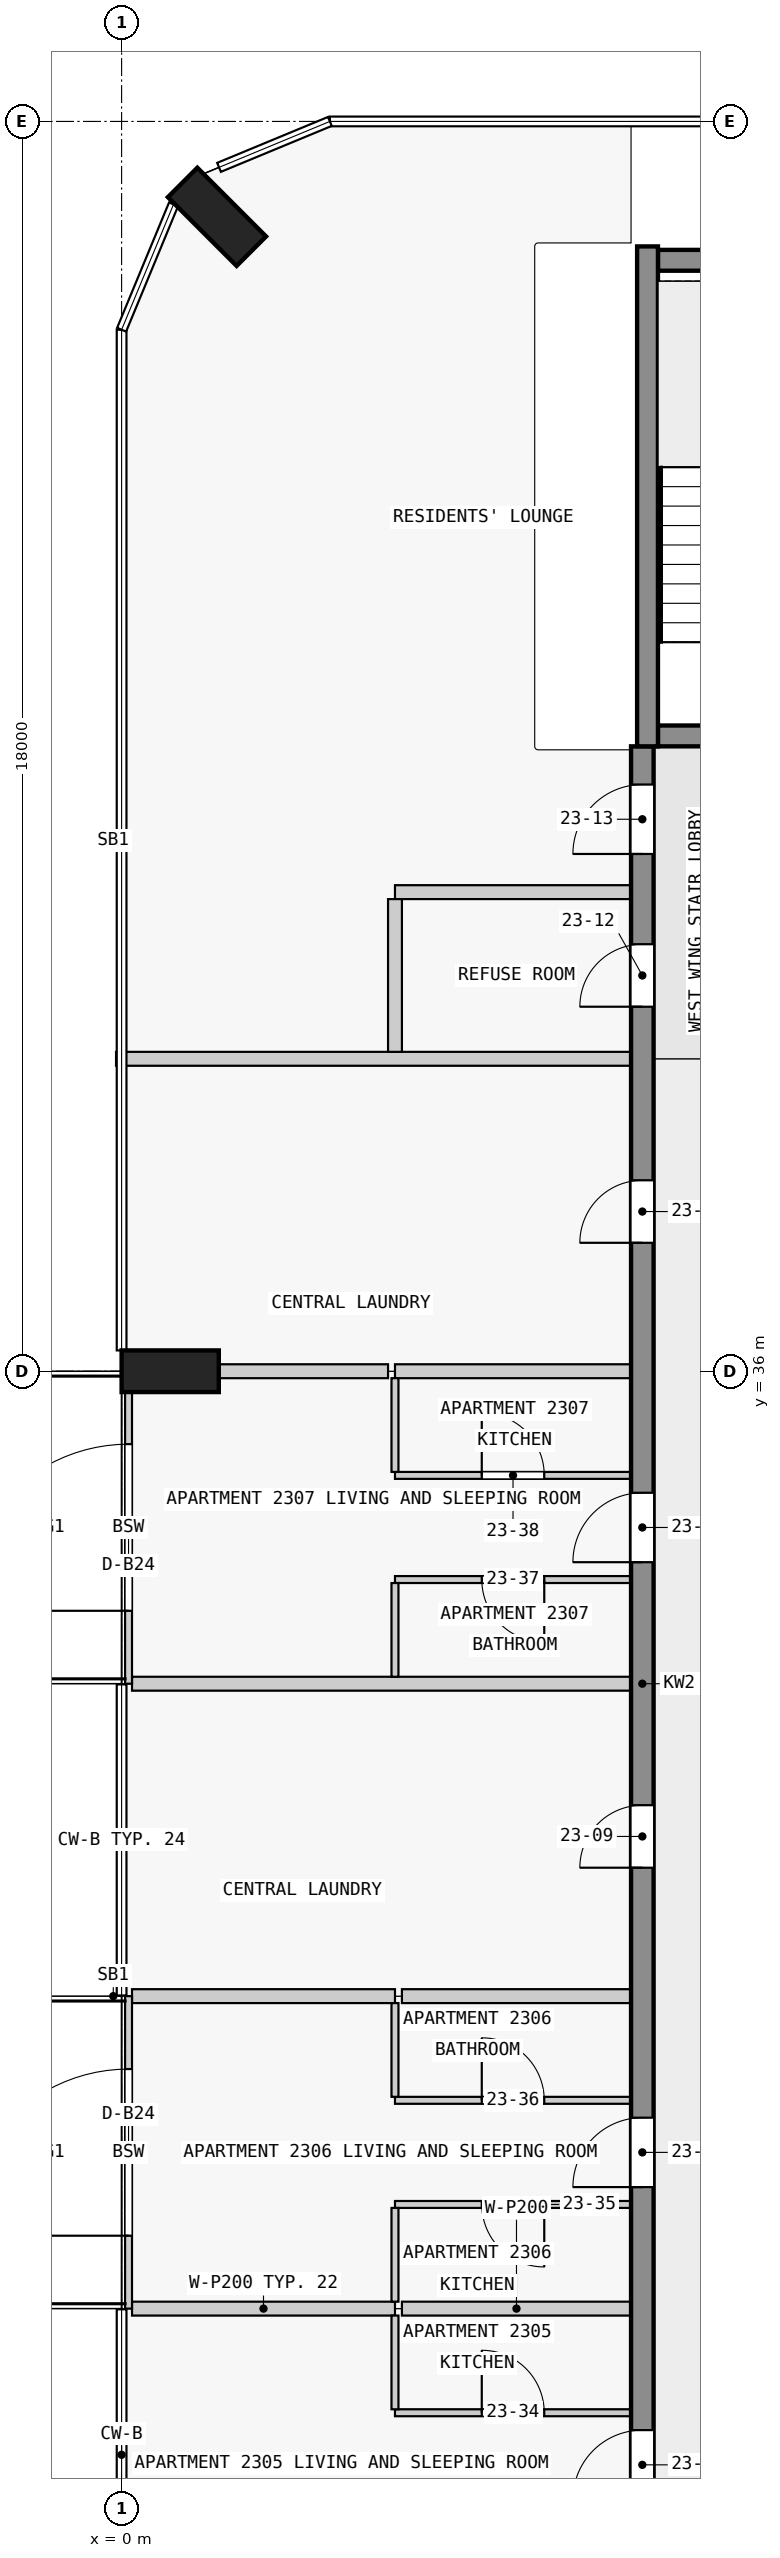
"""IFC4 building model, lengths in metres.
Left out: names, types, materials, properties, quantities, classifications, styles, units other than length and angle.
Written with IfcOpenShell. Run it as: python <this file> out.ifc"""

import sys

from ifc_helpers import new_model, si_unit, direction, frame, frame_2d, origin, origin_2d, place, context, subcontext, project, spatial, rectangle, extrude, element, fill, save


model = new_model("IFC4")
c1 = context("Model", 3, precision=1e-05, world=origin(), true_north=direction((0.0, 1.0)))
c2 = subcontext(c1, "Body", "Model", "MODEL_VIEW")
j1 = project(units=[si_unit("LENGTHUNIT", "METRE"), si_unit("PLANEANGLEUNIT", "RADIAN")], contexts=[c1])
p1 = place(None, origin())
s1 = spatial("IfcSite", under=j1, at=p1, CompositionType="ELEMENT")
p2 = place(p1, origin())
s2 = spatial("IfcBuilding", under=s1, at=p2, CompositionType="ELEMENT")
p3 = place(p2, frame((0.0, 0.0, 92.3)))
s3 = spatial("IfcBuildingStorey", under=s2, at=p3, CompositionType="ELEMENT", Elevation=92.3)
for number, where, z_axis, x_axis in (
    (1, (1.374, 52.626, 0.0), (0.0, 0.0, 1.0), (0.707, 0.707, 0.0)),
    (2, (0.7, 36.0, 0.0), (0.0, 0.0, 1.0), (0.0, 1.0, 0.0)),
):
    element("IfcColumn", number, at=place(p3, frame(where, z_axis=z_axis, x_axis=x_axis)), inside=s3, PredefinedType="COLUMN", context=c2, shape_type="SweptSolid", body=[
        extrude(rectangle(XDim=0.6, YDim=1.4, at=origin_2d()), origin(), (0.0, 0.0, 1.0), 3.5),
    ])
p4 = place(p3, frame((7.725, 45.15, 0.0), z_axis=(0.0, 0.0, 1.0), x_axis=(1.0, 0.0, 0.0)))
e3 = element("IfcWall", 3, at=p4, inside=s3, PredefinedType="SHEAR", context=c2, shape_type="SweptSolid", body=[
    extrude(rectangle(XDim=2.55, YDim=0.3, at=frame_2d((1.275, 0.0))), origin(), (0.0, 0.0, 1.0), 3.5),
])
p5 = place(p4, frame((0.725, 0.0, 0.0)))
e4 = element("IfcOpeningElement", 4, at=p5, cuts=e3, PredefinedType="OPENING", context=c2, shape_type="SweptSolid", body=[
    extrude(rectangle(XDim=1.1, YDim=2.1, at=frame_2d((0.55, 1.05))), frame((0.0, 0.16, 0.0), z_axis=(0.0, -1.0, 0.0), x_axis=(1.0, 0.0, 0.0)), (0.0, 0.0, 1.0), 0.32),
])
p6 = place(p3, frame((7.725, 52.0, 0.0), z_axis=(0.0, 0.0, 1.0), x_axis=(1.0, 0.0, 0.0)))
e5 = element("IfcWall", 5, at=p6, inside=s3, PredefinedType="SHEAR", context=c2, shape_type="SweptSolid", body=[
    extrude(rectangle(XDim=2.55, YDim=0.3, at=frame_2d((1.275, 0.0))), origin(), (0.0, 0.0, 1.0), 3.5),
])
p7 = place(p3, frame((7.575, 45.0, 0.0), z_axis=(0.0, 0.0, 1.0), x_axis=(0.0, 1.0, 0.0)))
e6 = element("IfcWall", 6, at=p7, inside=s3, PredefinedType="SHEAR", context=c2, shape_type="SweptSolid", body=[
    extrude(rectangle(XDim=7.2, YDim=0.3, at=frame_2d((3.6, 0.0))), origin(), (0.0, 0.0, 1.0), 3.5),
])
p8 = place(p3, frame((7.5, 18.0, 0.0), z_axis=(0.0, 0.0, 1.0), x_axis=(0.0, 1.0, 0.0)))
e7 = element("IfcWall", 7, at=p8, inside=s3, PredefinedType="SHEAR", context=c2, shape_type="SweptSolid", body=[
    extrude(rectangle(XDim=27.0, YDim=0.325, at=frame_2d((13.5, 0.0))), origin(), (0.0, 0.0, 1.0), 3.25),
])
p9 = place(p8, frame((1.75, 0.0, 0.0)))
e8 = element("IfcOpeningElement", 8, at=p9, cuts=e7, PredefinedType="OPENING", context=c2, shape_type="SweptSolid", body=[
    extrude(rectangle(XDim=1.0, YDim=2.1, at=frame_2d((0.5, 1.05))), frame((0.0, 0.172, 0.0), z_axis=(0.0, -1.0, 0.0), x_axis=(1.0, 0.0, 0.0)), (0.0, 0.0, 1.0), 0.345),
])
p10 = place(p8, frame((6.25, 0.0, 0.0)))
e9 = element("IfcOpeningElement", 9, at=p10, cuts=e7, PredefinedType="OPENING", context=c2, shape_type="SweptSolid", body=[
    extrude(rectangle(XDim=1.0, YDim=2.1, at=frame_2d((0.5, 1.05))), frame((0.0, 0.172, 0.0), z_axis=(0.0, -1.0, 0.0), x_axis=(1.0, 0.0, 0.0)), (0.0, 0.0, 1.0), 0.345),
])
p11 = place(p8, frame((10.85, 0.0, 0.0)))
e10 = element("IfcOpeningElement", 10, at=p11, cuts=e7, PredefinedType="OPENING", context=c2, shape_type="SweptSolid", body=[
    extrude(rectangle(XDim=0.9, YDim=2.1, at=frame_2d((0.45, 1.05))), frame((0.0, 0.172, 0.0), z_axis=(0.0, -1.0, 0.0), x_axis=(1.0, 0.0, 0.0)), (0.0, 0.0, 1.0), 0.345),
])
p12 = place(p8, frame((15.25, 0.0, 0.0)))
e11 = element("IfcOpeningElement", 11, at=p12, cuts=e7, PredefinedType="OPENING", context=c2, shape_type="SweptSolid", body=[
    extrude(rectangle(XDim=1.0, YDim=2.1, at=frame_2d((0.5, 1.05))), frame((0.0, 0.172, 0.0), z_axis=(0.0, -1.0, 0.0), x_axis=(1.0, 0.0, 0.0)), (0.0, 0.0, 1.0), 0.345),
])
p13 = place(p8, frame((19.85, 0.0, 0.0)))
e12 = element("IfcOpeningElement", 12, at=p13, cuts=e7, PredefinedType="OPENING", context=c2, shape_type="SweptSolid", body=[
    extrude(rectangle(XDim=0.9, YDim=2.1, at=frame_2d((0.45, 1.05))), frame((0.0, 0.172, 0.0), z_axis=(0.0, -1.0, 0.0), x_axis=(1.0, 0.0, 0.0)), (0.0, 0.0, 1.0), 0.345),
])
p14 = place(p8, frame((23.25, 0.0, 0.0)))
e13 = element("IfcOpeningElement", 13, at=p14, cuts=e7, PredefinedType="OPENING", context=c2, shape_type="SweptSolid", body=[
    extrude(rectangle(XDim=0.9, YDim=2.1, at=frame_2d((0.45, 1.05))), frame((0.0, 0.172, 0.0), z_axis=(0.0, -1.0, 0.0), x_axis=(1.0, 0.0, 0.0)), (0.0, 0.0, 1.0), 0.345),
])
p15 = place(p8, frame((25.45, 0.0, 0.0)))
e14 = element("IfcOpeningElement", 14, at=p15, cuts=e7, PredefinedType="OPENING", context=c2, shape_type="SweptSolid", body=[
    extrude(rectangle(XDim=1.0, YDim=2.1, at=frame_2d((0.5, 1.05))), frame((0.0, 0.172, 0.0), z_axis=(0.0, -1.0, 0.0), x_axis=(1.0, 0.0, 0.0)), (0.0, 0.0, 1.0), 0.345),
])
p16 = place(p3, frame((0.1, 22.5, 0.0), z_axis=(0.0, 0.0, 1.0), x_axis=(0.0, 1.0, 0.0)))
e15 = element("IfcWall", 15, at=p16, inside=s3, PredefinedType="STANDARD", context=c2, shape_type="SweptSolid", body=[
    extrude(rectangle(XDim=4.5, YDim=0.1, at=frame_2d((2.25, 0.0))), origin(), (0.0, 0.0, 1.0), 3.25),
])
p17 = place(p16, frame((1.05, 0.0, 0.0)))
e16 = element("IfcOpeningElement", 16, at=p17, cuts=e15, PredefinedType="OPENING", context=c2, shape_type="SweptSolid", body=[
    extrude(rectangle(XDim=2.4, YDim=2.4, at=frame_2d((1.2, 1.2))), frame((0.0, 0.06, 0.0), z_axis=(0.0, -1.0, 0.0), x_axis=(1.0, 0.0, 0.0)), (0.0, 0.0, 1.0), 0.12),
])
p18 = place(p3, frame((0.1, 31.5, 0.0), z_axis=(0.0, 0.0, 1.0), x_axis=(0.0, 1.0, 0.0)))
e17 = element("IfcWall", 17, at=p18, inside=s3, PredefinedType="STANDARD", context=c2, shape_type="SweptSolid", body=[
    extrude(rectangle(XDim=4.5, YDim=0.1, at=frame_2d((2.25, 0.0))), origin(), (0.0, 0.0, 1.0), 3.25),
])
p19 = place(p18, frame((1.05, 0.0, 0.0)))
e18 = element("IfcOpeningElement", 18, at=p19, cuts=e17, PredefinedType="OPENING", context=c2, shape_type="SweptSolid", body=[
    extrude(rectangle(XDim=2.4, YDim=2.4, at=frame_2d((1.2, 1.2))), frame((0.0, 0.06, 0.0), z_axis=(0.0, -1.0, 0.0), x_axis=(1.0, 0.0, 0.0)), (0.0, 0.0, 1.0), 0.12),
])
p20 = place(p3, frame((3.938, 21.0, 0.0), z_axis=(0.0, 0.0, 1.0), x_axis=(1.0, 0.0, 0.0)))
e19 = element("IfcWall", 19, at=p20, inside=s3, PredefinedType="PARTITIONING", context=c2, shape_type="SweptSolid", body=[
    extrude(rectangle(XDim=3.4, YDim=0.1, at=frame_2d((1.7, 0.0))), origin(), (0.0, 0.0, 1.0), 3.25),
])
p21 = place(p20, frame((1.25, 0.0, 0.0)))
e20 = element("IfcOpeningElement", 20, at=p21, cuts=e19, PredefinedType="OPENING", context=c2, shape_type="SweptSolid", body=[
    extrude(rectangle(XDim=0.9, YDim=2.1, at=frame_2d((0.45, 1.05))), frame((0.0, 0.06, 0.0), z_axis=(0.0, -1.0, 0.0), x_axis=(1.0, 0.0, 0.0)), (0.0, 0.0, 1.0), 0.12),
])
p22 = place(p3, frame((7.337, 22.5, 0.0), z_axis=(0.0, 0.0, 1.0), x_axis=(-1.0, 0.0, 0.0)))
e21 = element("IfcWall", 21, at=p22, inside=s3, PredefinedType="PARTITIONING", context=c2, shape_type="SweptSolid", body=[
    extrude(rectangle(XDim=3.3, YDim=0.2, at=frame_2d((1.65, 0.0))), origin(), (0.0, 0.0, 1.0), 3.25),
])
p23 = place(p3, frame((0.15, 22.5, 0.0), z_axis=(0.0, 0.0, 1.0), x_axis=(1.0, 0.0, 0.0)))
e22 = element("IfcWall", 22, at=p23, inside=s3, PredefinedType="PARTITIONING", context=c2, shape_type="SweptSolid", body=[
    extrude(rectangle(XDim=3.788, YDim=0.2, at=frame_2d((1.894, 0.0))), origin(), (0.0, 0.0, 1.0), 3.25),
])
p24 = place(p3, frame((7.337, 24.0, 0.0), z_axis=(0.0, 0.0, 1.0), x_axis=(-1.0, 0.0, 0.0)))
e23 = element("IfcWall", 23, at=p24, inside=s3, PredefinedType="PARTITIONING", context=c2, shape_type="SweptSolid", body=[
    extrude(rectangle(XDim=3.4, YDim=0.1, at=frame_2d((1.7, 0.0))), origin(), (0.0, 0.0, 1.0), 3.25),
])
p25 = place(p24, frame((1.25, 0.0, 0.0)))
e24 = element("IfcOpeningElement", 24, at=p25, cuts=e23, PredefinedType="OPENING", context=c2, shape_type="SweptSolid", body=[
    extrude(rectangle(XDim=0.9, YDim=2.1, at=frame_2d((0.45, 1.05))), frame((0.0, 0.06, 0.0), z_axis=(0.0, -1.0, 0.0), x_axis=(1.0, 0.0, 0.0)), (0.0, 0.0, 1.0), 0.12),
])
p26 = place(p3, frame((3.938, 25.5, 0.0), z_axis=(0.0, 0.0, 1.0), x_axis=(1.0, 0.0, 0.0)))
e25 = element("IfcWall", 25, at=p26, inside=s3, PredefinedType="PARTITIONING", context=c2, shape_type="SweptSolid", body=[
    extrude(rectangle(XDim=3.4, YDim=0.1, at=frame_2d((1.7, 0.0))), origin(), (0.0, 0.0, 1.0), 3.25),
])
p27 = place(p26, frame((1.25, 0.0, 0.0)))
e26 = element("IfcOpeningElement", 26, at=p27, cuts=e25, PredefinedType="OPENING", context=c2, shape_type="SweptSolid", body=[
    extrude(rectangle(XDim=0.9, YDim=2.1, at=frame_2d((0.45, 1.05))), frame((0.0, 0.06, 0.0), z_axis=(0.0, -1.0, 0.0), x_axis=(1.0, 0.0, 0.0)), (0.0, 0.0, 1.0), 0.12),
])
p28 = place(p3, frame((7.337, 27.0, 0.0), z_axis=(0.0, 0.0, 1.0), x_axis=(-1.0, 0.0, 0.0)))
e27 = element("IfcWall", 27, at=p28, inside=s3, PredefinedType="PARTITIONING", context=c2, shape_type="SweptSolid", body=[
    extrude(rectangle(XDim=3.3, YDim=0.2, at=frame_2d((1.65, 0.0))), origin(), (0.0, 0.0, 1.0), 3.25),
])
p29 = place(p3, frame((0.15, 27.0, 0.0), z_axis=(0.0, 0.0, 1.0), x_axis=(1.0, 0.0, 0.0)))
e28 = element("IfcWall", 28, at=p29, inside=s3, PredefinedType="PARTITIONING", context=c2, shape_type="SweptSolid", body=[
    extrude(rectangle(XDim=3.788, YDim=0.2, at=frame_2d((1.894, 0.0))), origin(), (0.0, 0.0, 1.0), 3.25),
])
p30 = place(p3, frame((7.337, 31.5, 0.0), z_axis=(0.0, 0.0, 1.0), x_axis=(-1.0, 0.0, 0.0)))
e29 = element("IfcWall", 29, at=p30, inside=s3, PredefinedType="PARTITIONING", context=c2, shape_type="SweptSolid", body=[
    extrude(rectangle(XDim=7.188, YDim=0.2, at=frame_2d((3.594, 0.0))), origin(), (0.0, 0.0, 1.0), 3.25),
])
p31 = place(p3, frame((7.337, 33.0, 0.0), z_axis=(0.0, 0.0, 1.0), x_axis=(-1.0, 0.0, 0.0)))
e30 = element("IfcWall", 30, at=p31, inside=s3, PredefinedType="PARTITIONING", context=c2, shape_type="SweptSolid", body=[
    extrude(rectangle(XDim=3.4, YDim=0.1, at=frame_2d((1.7, 0.0))), origin(), (0.0, 0.0, 1.0), 3.25),
])
p32 = place(p31, frame((1.25, 0.0, 0.0)))
e31 = element("IfcOpeningElement", 31, at=p32, cuts=e30, PredefinedType="OPENING", context=c2, shape_type="SweptSolid", body=[
    extrude(rectangle(XDim=0.9, YDim=2.1, at=frame_2d((0.45, 1.05))), frame((0.0, 0.06, 0.0), z_axis=(0.0, -1.0, 0.0), x_axis=(1.0, 0.0, 0.0)), (0.0, 0.0, 1.0), 0.12),
])
p33 = place(p3, frame((3.938, 34.5, 0.0), z_axis=(0.0, 0.0, 1.0), x_axis=(1.0, 0.0, 0.0)))
e32 = element("IfcWall", 32, at=p33, inside=s3, PredefinedType="PARTITIONING", context=c2, shape_type="SweptSolid", body=[
    extrude(rectangle(XDim=3.4, YDim=0.1, at=frame_2d((1.7, 0.0))), origin(), (0.0, 0.0, 1.0), 3.25),
])
p34 = place(p33, frame((1.25, 0.0, 0.0)))
e33 = element("IfcOpeningElement", 33, at=p34, cuts=e32, PredefinedType="OPENING", context=c2, shape_type="SweptSolid", body=[
    extrude(rectangle(XDim=0.9, YDim=2.1, at=frame_2d((0.45, 1.05))), frame((0.0, 0.06, 0.0), z_axis=(0.0, -1.0, 0.0), x_axis=(1.0, 0.0, 0.0)), (0.0, 0.0, 1.0), 0.12),
])
p35 = place(p3, frame((7.337, 36.0, 0.0), z_axis=(0.0, 0.0, 1.0), x_axis=(-1.0, 0.0, 0.0)))
e34 = element("IfcWall", 34, at=p35, inside=s3, PredefinedType="PARTITIONING", context=c2, shape_type="SweptSolid", body=[
    extrude(rectangle(XDim=3.4, YDim=0.2, at=frame_2d((1.7, 0.0))), origin(), (0.0, 0.0, 1.0), 3.25),
])
p36 = place(p3, frame((1.4, 36.0, 0.0), z_axis=(0.0, 0.0, 1.0), x_axis=(1.0, 0.0, 0.0)))
e35 = element("IfcWall", 35, at=p36, inside=s3, PredefinedType="PARTITIONING", context=c2, shape_type="SweptSolid", body=[
    extrude(rectangle(XDim=2.438, YDim=0.2, at=frame_2d((1.219, 0.0))), origin(), (0.0, 0.0, 1.0), 3.25),
])
p37 = place(p3, frame((7.337, 40.5, 0.0), z_axis=(0.0, 0.0, 1.0), x_axis=(-1.0, 0.0, 0.0)))
e36 = element("IfcWall", 36, at=p37, inside=s3, PredefinedType="PARTITIONING", context=c2, shape_type="SweptSolid", body=[
    extrude(rectangle(XDim=7.417, YDim=0.2, at=frame_2d((3.709, 0.0))), origin(), (0.0, 0.0, 1.0), 3.25),
])
p38 = place(p3, frame((7.337, 42.9, 0.0), z_axis=(0.0, 0.0, 1.0), x_axis=(-1.0, 0.0, 0.0)))
e37 = element("IfcWall", 37, at=p38, inside=s3, PredefinedType="PARTITIONING", context=c2, shape_type="SweptSolid", body=[
    extrude(rectangle(XDim=3.4, YDim=0.2, at=frame_2d((1.7, 0.0))), origin(), (0.0, 0.0, 1.0), 3.25),
])
for number, where, z_axis, x_axis in (
    (38, (3.938, 22.4, 0.0), (0.0, 0.0, 1.0), (0.0, -1.0, 0.0)),
    (39, (3.938, 23.95, 0.0), (0.0, 0.0, 1.0), (0.0, -1.0, 0.0)),
    (40, (3.938, 26.9, 0.0), (0.0, 0.0, 1.0), (0.0, -1.0, 0.0)),
    (41, (3.938, 32.95, 0.0), (0.0, 0.0, 1.0), (0.0, -1.0, 0.0)),
    (42, (3.938, 35.9, 0.0), (0.0, 0.0, 1.0), (0.0, -1.0, 0.0)),
):
    element("IfcWall", number, at=place(p3, frame(where, z_axis=z_axis, x_axis=x_axis)), inside=s3, PredefinedType="PARTITIONING", context=c2, shape_type="SweptSolid", body=[
        extrude(rectangle(XDim=1.35, YDim=0.1, at=frame_2d((0.675, 0.0))), origin(), (0.0, 0.0, 1.0), 3.25),
    ])
p39 = place(p3, frame((3.938, 42.8, 0.0), z_axis=(0.0, 0.0, 1.0), x_axis=(0.0, -1.0, 0.0)))
e43 = element("IfcWall", 43, at=p39, inside=s3, PredefinedType="PARTITIONING", context=c2, shape_type="SweptSolid", body=[
    extrude(rectangle(XDim=2.2, YDim=0.2, at=frame_2d((1.1, 0.0))), origin(), (0.0, 0.0, 1.0), 3.25),
])
p40 = place(p17, origin())
e44 = element("IfcDoor", 44, at=p40, inside=s3, OperationType="SINGLE_SWING_LEFT", PredefinedType="DOOR", context=c2, shape_type="SweptSolid", body=[
    extrude(rectangle(XDim=2.4, YDim=2.4, at=frame_2d((1.2, 1.2))), frame((0.0, 0.025, 0.0), z_axis=(0.0, -1.0, 0.0), x_axis=(1.0, 0.0, 0.0)), (0.0, 0.0, 1.0), 0.05),
])
fill(e16, e44)
p41 = place(p19, origin())
e45 = element("IfcDoor", 45, at=p41, inside=s3, OperationType="SINGLE_SWING_LEFT", PredefinedType="DOOR", context=c2, shape_type="SweptSolid", body=[
    extrude(rectangle(XDim=2.4, YDim=2.4, at=frame_2d((1.2, 1.2))), frame((0.0, 0.025, 0.0), z_axis=(0.0, -1.0, 0.0), x_axis=(1.0, 0.0, 0.0)), (0.0, 0.0, 1.0), 0.05),
])
fill(e18, e45)
p42 = place(p9, origin())
e46 = element("IfcDoor", 46, at=p42, inside=s3, OperationType="SINGLE_SWING_LEFT", PredefinedType="DOOR", context=c2, shape_type="SweptSolid", body=[
    extrude(rectangle(XDim=1.0, YDim=2.1, at=frame_2d((0.5, 1.05))), frame((0.0, 0.025, 0.0), z_axis=(0.0, -1.0, 0.0), x_axis=(1.0, 0.0, 0.0)), (0.0, 0.0, 1.0), 0.05),
])
fill(e8, e46)
p43 = place(p10, origin())
e47 = element("IfcDoor", 47, at=p43, inside=s3, OperationType="SINGLE_SWING_LEFT", PredefinedType="DOOR", context=c2, shape_type="SweptSolid", body=[
    extrude(rectangle(XDim=1.0, YDim=2.1, at=frame_2d((0.5, 1.05))), frame((0.0, 0.025, 0.0), z_axis=(0.0, -1.0, 0.0), x_axis=(1.0, 0.0, 0.0)), (0.0, 0.0, 1.0), 0.05),
])
fill(e9, e47)
p44 = place(p11, origin())
e48 = element("IfcDoor", 48, at=p44, inside=s3, OperationType="SINGLE_SWING_LEFT", PredefinedType="DOOR", context=c2, shape_type="SweptSolid", body=[
    extrude(rectangle(XDim=0.9, YDim=2.1, at=frame_2d((0.45, 1.05))), frame((0.0, 0.025, 0.0), z_axis=(0.0, -1.0, 0.0), x_axis=(1.0, 0.0, 0.0)), (0.0, 0.0, 1.0), 0.05),
])
fill(e10, e48)
p45 = place(p12, origin())
e49 = element("IfcDoor", 49, at=p45, inside=s3, OperationType="SINGLE_SWING_RIGHT", PredefinedType="DOOR", context=c2, shape_type="SweptSolid", body=[
    extrude(rectangle(XDim=1.0, YDim=2.1, at=frame_2d((0.5, 1.05))), frame((0.0, 0.025, 0.0), z_axis=(0.0, -1.0, 0.0), x_axis=(1.0, 0.0, 0.0)), (0.0, 0.0, 1.0), 0.05),
])
fill(e11, e49)
p46 = place(p13, origin())
e50 = element("IfcDoor", 50, at=p46, inside=s3, OperationType="SINGLE_SWING_RIGHT", PredefinedType="DOOR", context=c2, shape_type="SweptSolid", body=[
    extrude(rectangle(XDim=0.9, YDim=2.1, at=frame_2d((0.45, 1.05))), frame((0.0, 0.025, 0.0), z_axis=(0.0, -1.0, 0.0), x_axis=(1.0, 0.0, 0.0)), (0.0, 0.0, 1.0), 0.05),
])
fill(e12, e50)
p47 = place(p14, origin())
e51 = element("IfcDoor", 51, at=p47, inside=s3, OperationType="SINGLE_SWING_RIGHT", PredefinedType="DOOR", context=c2, shape_type="SweptSolid", body=[
    extrude(rectangle(XDim=0.9, YDim=2.1, at=frame_2d((0.45, 1.05))), frame((0.0, 0.025, 0.0), z_axis=(0.0, -1.0, 0.0), x_axis=(1.0, 0.0, 0.0)), (0.0, 0.0, 1.0), 0.05),
])
fill(e13, e51)
p48 = place(p15, origin())
e52 = element("IfcDoor", 52, at=p48, inside=s3, OperationType="SINGLE_SWING_RIGHT", PredefinedType="DOOR", context=c2, shape_type="SweptSolid", body=[
    extrude(rectangle(XDim=1.0, YDim=2.1, at=frame_2d((0.5, 1.05))), frame((0.0, 0.025, 0.0), z_axis=(0.0, -1.0, 0.0), x_axis=(1.0, 0.0, 0.0)), (0.0, 0.0, 1.0), 0.05),
])
fill(e14, e52)
p49 = place(p21, origin())
e53 = element("IfcDoor", 53, at=p49, inside=s3, OperationType="SINGLE_SWING_LEFT", PredefinedType="DOOR", context=c2, shape_type="SweptSolid", body=[
    extrude(rectangle(XDim=0.9, YDim=2.1, at=frame_2d((0.45, 1.05))), frame((0.0, 0.025, 0.0), z_axis=(0.0, -1.0, 0.0), x_axis=(1.0, 0.0, 0.0)), (0.0, 0.0, 1.0), 0.05),
])
fill(e20, e53)
p50 = place(p25, origin())
e54 = element("IfcDoor", 54, at=p50, inside=s3, OperationType="SINGLE_SWING_LEFT", PredefinedType="DOOR", context=c2, shape_type="SweptSolid", body=[
    extrude(rectangle(XDim=0.9, YDim=2.1, at=frame_2d((0.45, 1.05))), frame((0.0, 0.025, 0.0), z_axis=(0.0, -1.0, 0.0), x_axis=(1.0, 0.0, 0.0)), (0.0, 0.0, 1.0), 0.05),
])
fill(e24, e54)
p51 = place(p27, origin())
e55 = element("IfcDoor", 55, at=p51, inside=s3, OperationType="SINGLE_SWING_LEFT", PredefinedType="DOOR", context=c2, shape_type="SweptSolid", body=[
    extrude(rectangle(XDim=0.9, YDim=2.1, at=frame_2d((0.45, 1.05))), frame((0.0, 0.025, 0.0), z_axis=(0.0, -1.0, 0.0), x_axis=(1.0, 0.0, 0.0)), (0.0, 0.0, 1.0), 0.05),
])
fill(e26, e55)
p52 = place(p32, origin())
e56 = element("IfcDoor", 56, at=p52, inside=s3, OperationType="SINGLE_SWING_LEFT", PredefinedType="DOOR", context=c2, shape_type="SweptSolid", body=[
    extrude(rectangle(XDim=0.9, YDim=2.1, at=frame_2d((0.45, 1.05))), frame((0.0, 0.025, 0.0), z_axis=(0.0, -1.0, 0.0), x_axis=(1.0, 0.0, 0.0)), (0.0, 0.0, 1.0), 0.05),
])
fill(e31, e56)
p53 = place(p34, origin())
e57 = element("IfcDoor", 57, at=p53, inside=s3, OperationType="SINGLE_SWING_LEFT", PredefinedType="DOOR", context=c2, shape_type="SweptSolid", body=[
    extrude(rectangle(XDim=0.9, YDim=2.1, at=frame_2d((0.45, 1.05))), frame((0.0, 0.025, 0.0), z_axis=(0.0, -1.0, 0.0), x_axis=(1.0, 0.0, 0.0)), (0.0, 0.0, 1.0), 0.05),
])
fill(e33, e57)
save(model, sys.argv[1])
